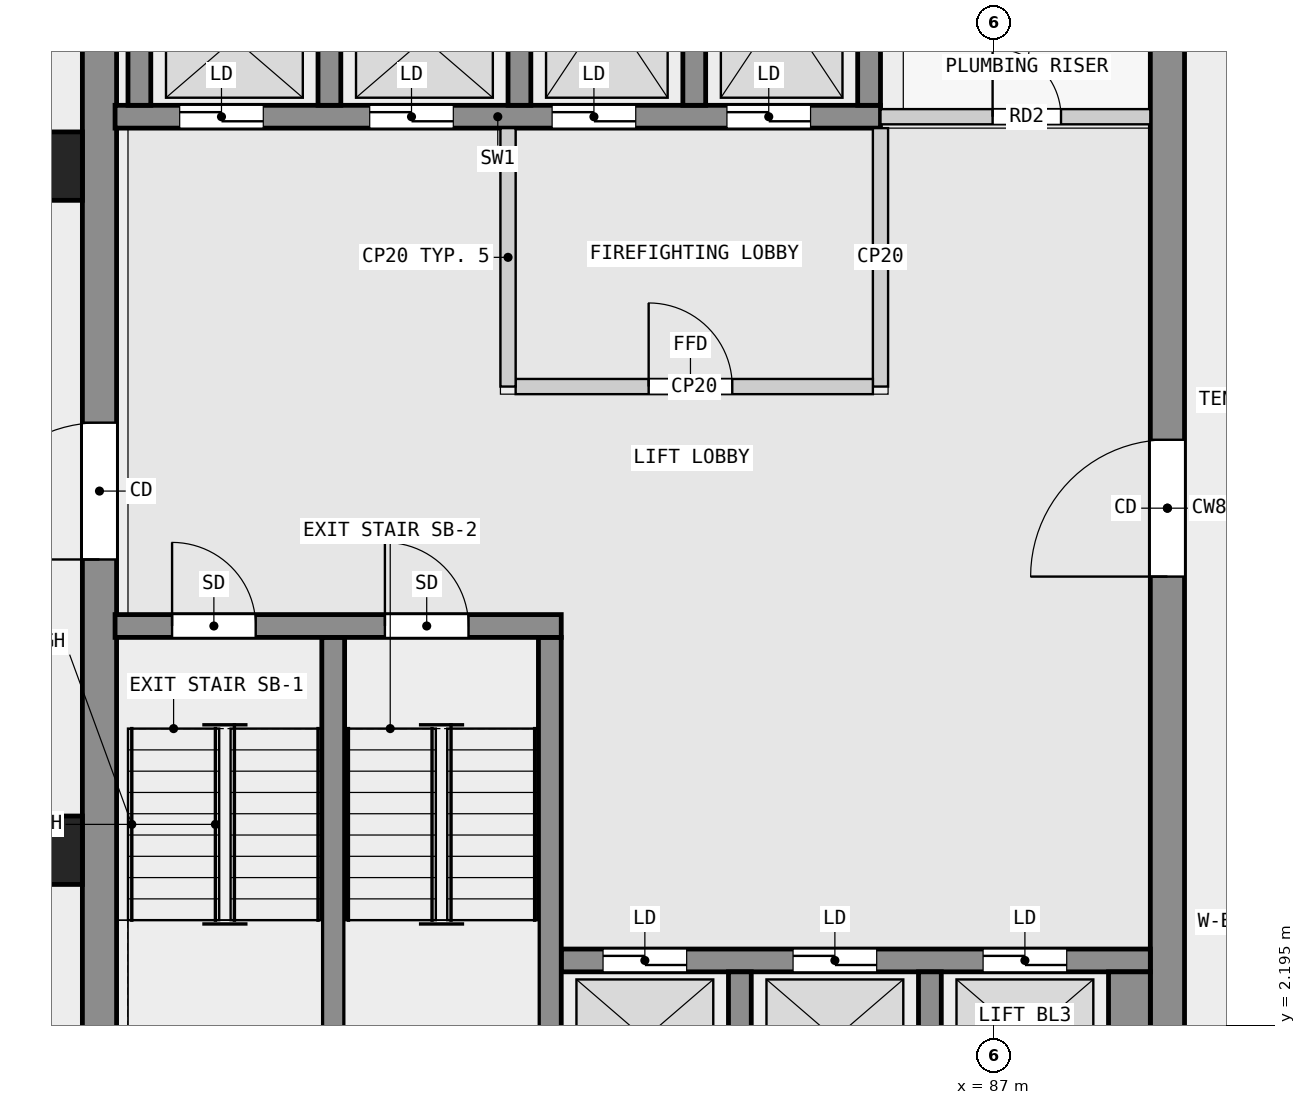
"""IFC4 building model, lengths in metres.
Left out: names, types, materials, properties, quantities, classifications, styles, units other than length and angle.
Written with IfcOpenShell. Run it as: python <this file> out.ifc"""

import sys

from ifc_helpers import new_model, si_unit, direction, frame, frame_2d, origin, origin_2d, place, context, subcontext, project, spatial, rectangle, extrude, element, fill, save


model = new_model("IFC4")
c1 = context("Model", 3, precision=1e-05, world=origin(), true_north=direction((0.0, 1.0)))
c2 = subcontext(c1, "Body", "Model", "MODEL_VIEW")
j1 = project(units=[si_unit("LENGTHUNIT", "METRE"), si_unit("PLANEANGLEUNIT", "RADIAN")], contexts=[c1])
p1 = place(None, origin())
s1 = spatial("IfcSite", under=j1, at=p1, CompositionType="ELEMENT")
p2 = place(p1, origin())
s2 = spatial("IfcBuilding", under=s1, at=p2, CompositionType="ELEMENT")
p3 = place(p2, frame((0.0, 0.0, 78.3)))
s3 = spatial("IfcBuildingStorey", under=s2, at=p3, CompositionType="ELEMENT", Elevation=78.3)
for number, where, z_axis, x_axis in (
    (1, (74.55, 13.5, 0.0), (0.0, 0.0, 1.0), (1.0, 0.0, 0.0)),
    (2, (74.55, 4.5, 0.0), (0.0, 0.0, 1.0), (1.0, 0.0, 0.0)),
):
    element("IfcColumn", number, at=place(p3, frame(where, z_axis=z_axis, x_axis=x_axis)), inside=s3, PredefinedType="COLUMN", context=c2, shape_type="SweptSolid", body=[
        extrude(rectangle(XDim=0.9, YDim=0.9, at=origin_2d()), origin(), (0.0, 0.0, 1.0), 3.5),
    ])
p4 = place(p3, frame((75.225, 0.45, 0.0), z_axis=(0.0, 0.0, 1.0), x_axis=(0.0, 1.0, 0.0)))
e3 = element("IfcWall", 3, at=p4, inside=s3, PredefinedType="SHEAR", context=c2, shape_type="SweptSolid", body=[
    extrude(rectangle(XDim=17.1, YDim=0.45, at=frame_2d((8.55, 0.0))), origin(), (0.0, 0.0, 1.0), 3.25),
])
p5 = place(p4, frame((7.875, 0.0, 0.0)))
e4 = element("IfcOpeningElement", 4, at=p5, cuts=e3, PredefinedType="OPENING", context=c2, shape_type="SweptSolid", body=[
    extrude(rectangle(XDim=1.8, YDim=2.1, at=frame_2d((0.9, 1.05))), frame((0.0, 0.235, 0.0), z_axis=(0.0, -1.0, 0.0), x_axis=(1.0, 0.0, 0.0)), (0.0, 0.0, 1.0), 0.47),
])
p6 = place(p3, frame((89.275, 0.45, 0.0), z_axis=(0.0, 0.0, 1.0), x_axis=(0.0, 1.0, 0.0)))
e5 = element("IfcWall", 5, at=p6, inside=s3, PredefinedType="SHEAR", context=c2, shape_type="SweptSolid", body=[
    extrude(rectangle(XDim=17.1, YDim=0.45, at=frame_2d((8.55, 0.0))), origin(), (0.0, 0.0, 1.0), 3.25),
])
p7 = place(p6, frame((7.65, 0.0, 0.0)))
e6 = element("IfcOpeningElement", 6, at=p7, cuts=e5, PredefinedType="OPENING", context=c2, shape_type="SweptSolid", body=[
    extrude(rectangle(XDim=1.8, YDim=2.1, at=frame_2d((0.9, 1.05))), frame((0.0, 0.235, 0.0), z_axis=(0.0, -1.0, 0.0), x_axis=(1.0, 0.0, 0.0)), (0.0, 0.0, 1.0), 0.47),
])
p8 = place(p6, frame((15.65, 0.0, 0.0)))
e7 = element("IfcOpeningElement", 7, at=p8, cuts=e5, PredefinedType="OPENING", context=c2, shape_type="SweptSolid", body=[
    extrude(rectangle(XDim=0.9, YDim=2.1, at=frame_2d((0.45, 1.05))), frame((0.0, 0.235, 0.0), z_axis=(0.0, -1.0, 0.0), x_axis=(1.0, 0.0, 0.0)), (0.0, 0.0, 1.0), 0.47),
])
p9 = place(p3, frame((75.43, 7.45, 0.0), z_axis=(0.0, 0.0, 1.0), x_axis=(1.0, 0.0, 0.0)))
e8 = element("IfcWall", 8, at=p9, inside=s3, PredefinedType="SHEAR", context=c2, shape_type="SweptSolid", body=[
    extrude(rectangle(XDim=5.87, YDim=0.3, at=frame_2d((2.935, 0.0))), origin(), (0.0, 0.0, 1.0), 3.25),
])
p10 = place(p9, frame((0.75, 0.0, 0.0)))
e9 = element("IfcOpeningElement", 9, at=p10, cuts=e8, PredefinedType="OPENING", context=c2, shape_type="SweptSolid", body=[
    extrude(rectangle(XDim=1.1, YDim=2.1, at=frame_2d((0.55, 1.05))), frame((0.0, 0.16, 0.0), z_axis=(0.0, -1.0, 0.0), x_axis=(1.0, 0.0, 0.0)), (0.0, 0.0, 1.0), 0.32),
])
p11 = place(p9, frame((3.55, 0.0, 0.0)))
e10 = element("IfcOpeningElement", 10, at=p11, cuts=e8, PredefinedType="OPENING", context=c2, shape_type="SweptSolid", body=[
    extrude(rectangle(XDim=1.1, YDim=2.1, at=frame_2d((0.55, 1.05))), frame((0.0, 0.16, 0.0), z_axis=(0.0, -1.0, 0.0), x_axis=(1.0, 0.0, 0.0)), (0.0, 0.0, 1.0), 0.32),
])
for number, where, z_axis, x_axis in (
    (11, (78.3, 0.9, 0.0), (0.0, 0.0, 1.0), (0.0, 1.0, 0.0)),
    (12, (81.15, 0.9, 0.0), (0.0, 0.0, 1.0), (0.0, 1.0, 0.0)),
):
    element("IfcWall", number, at=place(p3, frame(where, z_axis=z_axis, x_axis=x_axis)), inside=s3, PredefinedType="SHEAR", context=c2, shape_type="SweptSolid", body=[
        extrude(rectangle(XDim=6.4, YDim=0.3, at=frame_2d((3.2, 0.0))), origin(), (0.0, 0.0, 1.0), 3.25),
    ])
for number, where, z_axis, x_axis in (
    (13, (83.65, 0.9, 0.0), (0.0, 0.0, 1.0), (0.0, 1.0, 0.0)),
    (14, (86.15, 0.9, 0.0), (0.0, 0.0, 1.0), (0.0, 1.0, 0.0)),
):
    element("IfcWall", number, at=place(p3, frame(where, z_axis=z_axis, x_axis=x_axis)), inside=s3, PredefinedType="SHEAR", context=c2, shape_type="SweptSolid", body=[
        extrude(rectangle(XDim=2.0, YDim=0.3, at=frame_2d((1.0, 0.0))), origin(), (0.0, 0.0, 1.0), 3.25),
    ])
p12 = place(p3, frame((88.775, 0.9, 0.0), z_axis=(0.0, 0.0, 1.0), x_axis=(0.0, 1.0, 0.0)))
e15 = element("IfcWall", 15, at=p12, inside=s3, PredefinedType="SHEAR", context=c2, shape_type="SweptSolid", body=[
    extrude(rectangle(XDim=2.0, YDim=0.55, at=frame_2d((1.0, 0.0))), origin(), (0.0, 0.0, 1.0), 3.25),
])
p13 = place(p3, frame((81.3, 3.05, 0.0), z_axis=(0.0, 0.0, 1.0), x_axis=(1.0, 0.0, 0.0)))
e16 = element("IfcWall", 16, at=p13, inside=s3, PredefinedType="SHEAR", context=c2, shape_type="SweptSolid", body=[
    extrude(rectangle(XDim=7.75, YDim=0.3, at=frame_2d((3.875, 0.0))), origin(), (0.0, 0.0, 1.0), 3.25),
])
p14 = place(p13, frame((0.55, 0.0, 0.0)))
e17 = element("IfcOpeningElement", 17, at=p14, cuts=e16, PredefinedType="OPENING", context=c2, shape_type="SweptSolid", body=[
    extrude(rectangle(XDim=1.1, YDim=2.1, at=frame_2d((0.55, 1.05))), frame((0.0, 0.16, 0.0), z_axis=(0.0, -1.0, 0.0), x_axis=(1.0, 0.0, 0.0)), (0.0, 0.0, 1.0), 0.32),
])
p15 = place(p13, frame((3.05, 0.0, 0.0)))
e18 = element("IfcOpeningElement", 18, at=p15, cuts=e16, PredefinedType="OPENING", context=c2, shape_type="SweptSolid", body=[
    extrude(rectangle(XDim=1.1, YDim=2.1, at=frame_2d((0.55, 1.05))), frame((0.0, 0.16, 0.0), z_axis=(0.0, -1.0, 0.0), x_axis=(1.0, 0.0, 0.0)), (0.0, 0.0, 1.0), 0.32),
])
p16 = place(p13, frame((5.55, 0.0, 0.0)))
e19 = element("IfcOpeningElement", 19, at=p16, cuts=e16, PredefinedType="OPENING", context=c2, shape_type="SweptSolid", body=[
    extrude(rectangle(XDim=1.1, YDim=2.1, at=frame_2d((0.55, 1.05))), frame((0.0, 0.16, 0.0), z_axis=(0.0, -1.0, 0.0), x_axis=(1.0, 0.0, 0.0)), (0.0, 0.0, 1.0), 0.32),
])
p17 = place(p3, frame((75.43, 14.15, 0.0), z_axis=(0.0, 0.0, 1.0), x_axis=(1.0, 0.0, 0.0)))
e20 = element("IfcWall", 20, at=p17, inside=s3, PredefinedType="SHEAR", context=c2, shape_type="SweptSolid", body=[
    extrude(rectangle(XDim=10.07, YDim=0.3, at=frame_2d((5.035, 0.0))), origin(), (0.0, 0.0, 1.0), 3.25),
])
p18 = place(p17, frame((0.85, 0.0, 0.0)))
e21 = element("IfcOpeningElement", 21, at=p18, cuts=e20, PredefinedType="OPENING", context=c2, shape_type="SweptSolid", body=[
    extrude(rectangle(XDim=1.1, YDim=2.1, at=frame_2d((0.55, 1.05))), frame((0.0, 0.16, 0.0), z_axis=(0.0, -1.0, 0.0), x_axis=(1.0, 0.0, 0.0)), (0.0, 0.0, 1.0), 0.32),
])
p19 = place(p17, frame((3.35, 0.0, 0.0)))
e22 = element("IfcOpeningElement", 22, at=p19, cuts=e20, PredefinedType="OPENING", context=c2, shape_type="SweptSolid", body=[
    extrude(rectangle(XDim=1.1, YDim=2.1, at=frame_2d((0.55, 1.05))), frame((0.0, 0.16, 0.0), z_axis=(0.0, -1.0, 0.0), x_axis=(1.0, 0.0, 0.0)), (0.0, 0.0, 1.0), 0.32),
])
p20 = place(p17, frame((5.75, 0.0, 0.0)))
e23 = element("IfcOpeningElement", 23, at=p20, cuts=e20, PredefinedType="OPENING", context=c2, shape_type="SweptSolid", body=[
    extrude(rectangle(XDim=1.1, YDim=2.1, at=frame_2d((0.55, 1.05))), frame((0.0, 0.16, 0.0), z_axis=(0.0, -1.0, 0.0), x_axis=(1.0, 0.0, 0.0)), (0.0, 0.0, 1.0), 0.32),
])
p21 = place(p17, frame((8.05, 0.0, 0.0)))
e24 = element("IfcOpeningElement", 24, at=p21, cuts=e20, PredefinedType="OPENING", context=c2, shape_type="SweptSolid", body=[
    extrude(rectangle(XDim=1.1, YDim=2.1, at=frame_2d((0.55, 1.05))), frame((0.0, 0.16, 0.0), z_axis=(0.0, -1.0, 0.0), x_axis=(1.0, 0.0, 0.0)), (0.0, 0.0, 1.0), 0.32),
])
for number, where, z_axis, x_axis in (
    (25, (75.75, 14.3, 0.0), (0.0, 0.0, 1.0), (0.0, 1.0, 0.0)),
    (26, (78.25, 14.3, 0.0), (0.0, 0.0, 1.0), (0.0, 1.0, 0.0)),
    (27, (80.75, 14.3, 0.0), (0.0, 0.0, 1.0), (0.0, 1.0, 0.0)),
    (28, (83.05, 14.3, 0.0), (0.0, 0.0, 1.0), (0.0, 1.0, 0.0)),
    (29, (85.35, 14.3, 0.0), (0.0, 0.0, 1.0), (0.0, 1.0, 0.0)),
):
    element("IfcWall", number, at=place(p3, frame(where, z_axis=z_axis, x_axis=x_axis)), inside=s3, PredefinedType="SHEAR", context=c2, shape_type="SweptSolid", body=[
        extrude(rectangle(XDim=2.8, YDim=0.3, at=frame_2d((1.4, 0.0))), origin(), (0.0, 0.0, 1.0), 3.25),
    ])
p22 = place(p3, frame((80.6, 10.6, 0.0), z_axis=(0.0, 0.0, 1.0), x_axis=(0.0, 1.0, 0.0)))
e30 = element("IfcWall", 30, at=p22, inside=s3, PredefinedType="PARTITIONING", context=c2, shape_type="SweptSolid", body=[
    extrude(rectangle(XDim=3.4, YDim=0.2, at=frame_2d((1.7, 0.0))), origin(), (0.0, 0.0, 1.0), 3.25),
])
p23 = place(p3, frame((80.7, 10.6, 0.0), z_axis=(0.0, 0.0, 1.0), x_axis=(1.0, 0.0, 0.0)))
e31 = element("IfcWall", 31, at=p23, inside=s3, PredefinedType="PARTITIONING", context=c2, shape_type="SweptSolid", body=[
    extrude(rectangle(XDim=4.7, YDim=0.2, at=frame_2d((2.35, 0.0))), origin(), (0.0, 0.0, 1.0), 3.25),
])
p24 = place(p23, frame((1.75, 0.0, 0.0)))
e32 = element("IfcOpeningElement", 32, at=p24, cuts=e31, PredefinedType="OPENING", context=c2, shape_type="SweptSolid", body=[
    extrude(rectangle(XDim=1.1, YDim=2.1, at=frame_2d((0.55, 1.05))), frame((0.0, 0.11, 0.0), z_axis=(0.0, -1.0, 0.0), x_axis=(1.0, 0.0, 0.0)), (0.0, 0.0, 1.0), 0.22),
])
p25 = place(p3, frame((85.5, 10.6, 0.0), z_axis=(0.0, 0.0, 1.0), x_axis=(0.0, 1.0, 0.0)))
e33 = element("IfcWall", 33, at=p25, inside=s3, PredefinedType="PARTITIONING", context=c2, shape_type="SweptSolid", body=[
    extrude(rectangle(XDim=3.4, YDim=0.2, at=frame_2d((1.7, 0.0))), origin(), (0.0, 0.0, 1.0), 3.25),
])
p26 = place(p3, frame((85.5, 14.15, 0.0), z_axis=(0.0, 0.0, 1.0), x_axis=(1.0, 0.0, 0.0)))
e34 = element("IfcWall", 34, at=p26, inside=s3, PredefinedType="PARTITIONING", context=c2, shape_type="SweptSolid", body=[
    extrude(rectangle(XDim=3.55, YDim=0.2, at=frame_2d((1.775, 0.0))), origin(), (0.0, 0.0, 1.0), 3.25),
])
p27 = place(p26, frame((1.475, 0.0, 0.0)))
e35 = element("IfcOpeningElement", 35, at=p27, cuts=e34, PredefinedType="OPENING", context=c2, shape_type="SweptSolid", body=[
    extrude(rectangle(XDim=0.9, YDim=2.1, at=frame_2d((0.45, 1.05))), frame((0.0, 0.11, 0.0), z_axis=(0.0, -1.0, 0.0), x_axis=(1.0, 0.0, 0.0)), (0.0, 0.0, 1.0), 0.22),
])
p28 = place(p24, origin())
e36 = element("IfcDoor", 36, at=p28, inside=s3, OperationType="SINGLE_SWING_LEFT", PredefinedType="DOOR", context=c2, shape_type="SweptSolid", body=[
    extrude(rectangle(XDim=1.1, YDim=2.1, at=frame_2d((0.55, 1.05))), frame((0.0, 0.025, 0.0), z_axis=(0.0, -1.0, 0.0), x_axis=(1.0, 0.0, 0.0)), (0.0, 0.0, 1.0), 0.05),
])
fill(e32, e36)
p29 = place(p14, origin())
e37 = element("IfcDoor", 37, at=p29, inside=s3, OperationType="DOUBLE_DOOR_SLIDING", PredefinedType="DOOR", context=c2, shape_type="SweptSolid", body=[
    extrude(rectangle(XDim=1.1, YDim=2.1, at=frame_2d((0.55, 1.05))), frame((0.0, 0.025, 0.0), z_axis=(0.0, -1.0, 0.0), x_axis=(1.0, 0.0, 0.0)), (0.0, 0.0, 1.0), 0.05),
])
fill(e17, e37)
p30 = place(p15, origin())
e38 = element("IfcDoor", 38, at=p30, inside=s3, OperationType="DOUBLE_DOOR_SLIDING", PredefinedType="DOOR", context=c2, shape_type="SweptSolid", body=[
    extrude(rectangle(XDim=1.1, YDim=2.1, at=frame_2d((0.55, 1.05))), frame((0.0, 0.025, 0.0), z_axis=(0.0, -1.0, 0.0), x_axis=(1.0, 0.0, 0.0)), (0.0, 0.0, 1.0), 0.05),
])
fill(e18, e38)
p31 = place(p16, origin())
e39 = element("IfcDoor", 39, at=p31, inside=s3, OperationType="DOUBLE_DOOR_SLIDING", PredefinedType="DOOR", context=c2, shape_type="SweptSolid", body=[
    extrude(rectangle(XDim=1.1, YDim=2.1, at=frame_2d((0.55, 1.05))), frame((0.0, 0.025, 0.0), z_axis=(0.0, -1.0, 0.0), x_axis=(1.0, 0.0, 0.0)), (0.0, 0.0, 1.0), 0.05),
])
fill(e19, e39)
p32 = place(p18, origin())
e40 = element("IfcDoor", 40, at=p32, inside=s3, OperationType="DOUBLE_DOOR_SLIDING", PredefinedType="DOOR", context=c2, shape_type="SweptSolid", body=[
    extrude(rectangle(XDim=1.1, YDim=2.1, at=frame_2d((0.55, 1.05))), frame((0.0, 0.025, 0.0), z_axis=(0.0, -1.0, 0.0), x_axis=(1.0, 0.0, 0.0)), (0.0, 0.0, 1.0), 0.05),
])
fill(e21, e40)
p33 = place(p19, origin())
e41 = element("IfcDoor", 41, at=p33, inside=s3, OperationType="DOUBLE_DOOR_SLIDING", PredefinedType="DOOR", context=c2, shape_type="SweptSolid", body=[
    extrude(rectangle(XDim=1.1, YDim=2.1, at=frame_2d((0.55, 1.05))), frame((0.0, 0.025, 0.0), z_axis=(0.0, -1.0, 0.0), x_axis=(1.0, 0.0, 0.0)), (0.0, 0.0, 1.0), 0.05),
])
fill(e22, e41)
p34 = place(p20, origin())
e42 = element("IfcDoor", 42, at=p34, inside=s3, OperationType="DOUBLE_DOOR_SLIDING", PredefinedType="DOOR", context=c2, shape_type="SweptSolid", body=[
    extrude(rectangle(XDim=1.1, YDim=2.1, at=frame_2d((0.55, 1.05))), frame((0.0, 0.025, 0.0), z_axis=(0.0, -1.0, 0.0), x_axis=(1.0, 0.0, 0.0)), (0.0, 0.0, 1.0), 0.05),
])
fill(e23, e42)
p35 = place(p21, origin())
e43 = element("IfcDoor", 43, at=p35, inside=s3, OperationType="DOUBLE_DOOR_SLIDING", PredefinedType="DOOR", context=c2, shape_type="SweptSolid", body=[
    extrude(rectangle(XDim=1.1, YDim=2.1, at=frame_2d((0.55, 1.05))), frame((0.0, 0.025, 0.0), z_axis=(0.0, -1.0, 0.0), x_axis=(1.0, 0.0, 0.0)), (0.0, 0.0, 1.0), 0.05),
])
fill(e24, e43)
p36 = place(p10, origin())
e44 = element("IfcDoor", 44, at=p36, inside=s3, OperationType="SINGLE_SWING_RIGHT", PredefinedType="DOOR", context=c2, shape_type="SweptSolid", body=[
    extrude(rectangle(XDim=1.1, YDim=2.1, at=frame_2d((0.55, 1.05))), frame((0.0, 0.025, 0.0), z_axis=(0.0, -1.0, 0.0), x_axis=(1.0, 0.0, 0.0)), (0.0, 0.0, 1.0), 0.05),
])
fill(e9, e44)
p37 = place(p11, origin())
e45 = element("IfcDoor", 45, at=p37, inside=s3, OperationType="SINGLE_SWING_LEFT", PredefinedType="DOOR", context=c2, shape_type="SweptSolid", body=[
    extrude(rectangle(XDim=1.1, YDim=2.1, at=frame_2d((0.55, 1.05))), frame((0.0, 0.025, 0.0), z_axis=(0.0, -1.0, 0.0), x_axis=(1.0, 0.0, 0.0)), (0.0, 0.0, 1.0), 0.05),
])
fill(e10, e45)
p38 = place(p5, origin())
e46 = element("IfcDoor", 46, at=p38, inside=s3, OperationType="DOUBLE_DOOR_SINGLE_SWING", PredefinedType="DOOR", context=c2, shape_type="SweptSolid", body=[
    extrude(rectangle(XDim=1.8, YDim=2.1, at=frame_2d((0.9, 1.05))), frame((0.0, 0.025, 0.0), z_axis=(0.0, -1.0, 0.0), x_axis=(1.0, 0.0, 0.0)), (0.0, 0.0, 1.0), 0.05),
])
fill(e4, e46)
p39 = place(p7, origin())
e47 = element("IfcDoor", 47, at=p39, inside=s3, OperationType="DOUBLE_DOOR_SINGLE_SWING", PredefinedType="DOOR", context=c2, shape_type="SweptSolid", body=[
    extrude(rectangle(XDim=1.8, YDim=2.1, at=frame_2d((0.9, 1.05))), frame((0.0, 0.025, 0.0), z_axis=(0.0, -1.0, 0.0), x_axis=(1.0, 0.0, 0.0)), (0.0, 0.0, 1.0), 0.05),
])
fill(e6, e47)
p40 = place(p27, origin())
e48 = element("IfcDoor", 48, at=p40, inside=s3, OperationType="SINGLE_SWING_LEFT", PredefinedType="DOOR", context=c2, shape_type="SweptSolid", body=[
    extrude(rectangle(XDim=0.9, YDim=2.1, at=frame_2d((0.45, 1.05))), frame((0.0, 0.025, 0.0), z_axis=(0.0, -1.0, 0.0), x_axis=(1.0, 0.0, 0.0)), (0.0, 0.0, 1.0), 0.05),
])
fill(e35, e48)
save(model, sys.argv[1])
